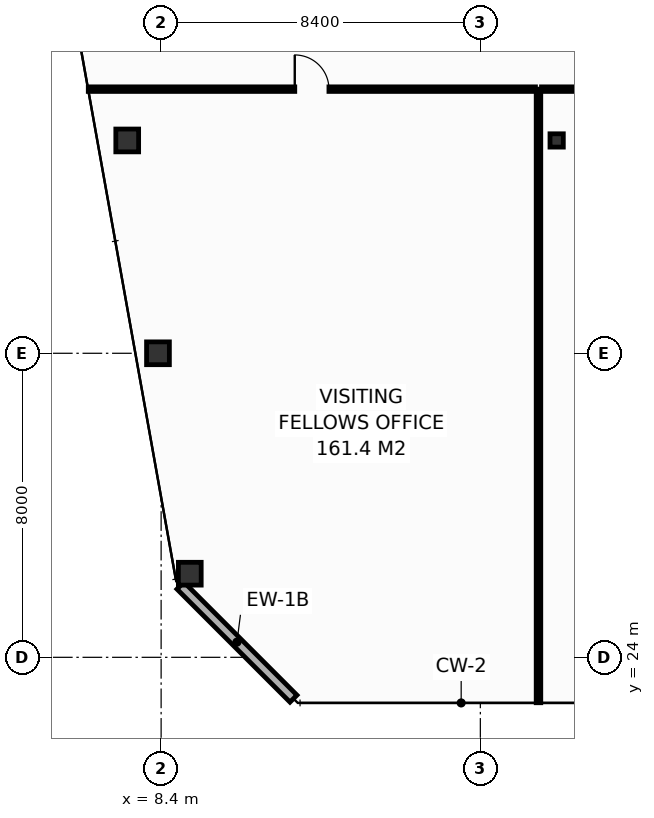
"""IFC4 building model, lengths in metres.
Left out: names, types, materials, properties, quantities, classifications, styles, units other than length and angle.
Written with IfcOpenShell. Run it as: python <this file> out.ifc"""

import sys

from ifc_helpers import new_model, si_unit, direction, frame, frame_2d, origin, origin_2d, place, context, subcontext, project, spatial, rectangle, hollow_rectangle, extrude, element, fill, save


model = new_model("IFC4")
c1 = context("Model", 3, precision=1e-05, world=origin(), true_north=direction((0.0, 1.0)))
c2 = subcontext(c1, "Body", "Model", "MODEL_VIEW")
j1 = project(units=[si_unit("LENGTHUNIT", "METRE"), si_unit("PLANEANGLEUNIT", "RADIAN")], contexts=[c1])
p1 = place(None, origin())
s1 = spatial("IfcSite", under=j1, at=p1, CompositionType="ELEMENT")
p2 = place(p1, origin())
s2 = spatial("IfcBuilding", under=s1, at=p2, CompositionType="ELEMENT")
p3 = place(p2, frame((0.0, 0.0, 264.8)))
s3 = spatial("IfcBuildingStorey", under=s2, at=p3, CompositionType="ELEMENT", Elevation=264.8)
for number, where, z_axis, x_axis in (
    (1, (9.154, 26.2, 0.0), (0.0, 0.0, 1.0), (1.0, 0.0, 0.0)),
    (2, (8.317, 32.0, 0.0), (0.0, 0.0, 1.0), (1.0, 0.0, 0.0)),
    (3, (7.508, 37.6, 0.0), (0.0, 0.0, 1.0), (1.0, 0.0, 0.0)),
):
    element("IfcColumn", number, at=place(p3, frame(where, z_axis=z_axis, x_axis=x_axis)), inside=s3, PredefinedType="COLUMN", context=c2, shape_type="SweptSolid", body=[
        extrude(hollow_rectangle(XDim=0.6, YDim=0.6, WallThickness=0.028, at=origin_2d()), origin(), (0.0, 0.0, 1.0), 3.8),
    ])
p4 = place(p3, frame((18.808, 37.6, 0.0), z_axis=(0.0, 0.0, 1.0), x_axis=(1.0, 0.0, 0.0)))
e4 = element("IfcColumn", 4, at=p4, inside=s3, PredefinedType="COLUMN", context=c2, shape_type="SweptSolid", body=[
    extrude(hollow_rectangle(XDim=0.35, YDim=0.35, WallThickness=0.016, at=origin_2d()), origin(), (0.0, 0.0, 1.0), 3.8),
])
p5 = place(p3, frame((8.909, 25.887, 0.0), z_axis=(0.0, 0.0, 1.0), x_axis=(0.707106781187, -0.707106781187, 0.0)))
e5 = element("IfcWall", 5, at=p5, inside=s3, PredefinedType="STANDARD", context=c2, shape_type="SweptSolid", body=[
    extrude(rectangle(XDim=4.206, YDim=0.26, at=frame_2d((2.103, 0.0))), origin(), (0.0, 0.0, 1.0), 3.55),
])
p6 = place(p3, frame((18.33, 22.805, 0.0), z_axis=(0.0, 0.0, 1.0), x_axis=(0.0, 1.0, 0.0)))
e6 = element("IfcWall", 6, at=p6, inside=s3, PredefinedType="PARTITIONING", context=c2, shape_type="SweptSolid", body=[
    extrude(rectangle(XDim=16.145, YDim=0.12, at=frame_2d((8.073, 0.0))), origin(), (0.0, 0.0, 1.0), 2.947),
])
p7 = place(p3, frame((6.483, 38.95, 0.0), z_axis=(0.0, 0.0, 1.0), x_axis=(1.0, 0.0, 0.0)))
e7 = element("IfcWall", 7, at=p7, inside=s3, PredefinedType="PARTITIONING", context=c2, shape_type="SweptSolid", body=[
    extrude(rectangle(XDim=11.767, YDim=0.12, at=frame_2d((5.883, 0.0))), origin(), (0.0, 0.0, 1.0), 3.085),
])
p8 = place(p7, frame((5.433, 0.0, 0.0)))
e8 = element("IfcOpeningElement", 8, at=p8, cuts=e7, PredefinedType="OPENING", context=c2, shape_type="SweptSolid", body=[
    extrude(rectangle(XDim=0.9, YDim=2.1, at=frame_2d((0.45, 1.05))), frame((0.0, 0.07, 0.0), z_axis=(0.0, -1.0, 0.0), x_axis=(1.0, 0.0, 0.0)), (0.0, 0.0, 1.0), 0.14),
])
p9 = place(p3, frame((18.41, 38.95, 0.0), z_axis=(0.0, 0.0, 1.0), x_axis=(1.0, 0.0, 0.0)))
e9 = element("IfcWall", 9, at=p9, inside=s3, PredefinedType="PARTITIONING", context=c2, shape_type="SweptSolid", body=[
    extrude(rectangle(XDim=9.173, YDim=0.12, at=frame_2d((4.586, 0.0))), origin(), (0.0, 0.0, 1.0), 2.947),
])
p10 = place(p9, frame((4.136, 0.0, 0.0)))
e10 = element("IfcOpeningElement", 10, at=p10, cuts=e9, PredefinedType="OPENING", context=c2, shape_type="SweptSolid", body=[
    extrude(rectangle(XDim=0.9, YDim=2.1, at=frame_2d((0.45, 1.05))), frame((0.0, 0.07, 0.0), z_axis=(0.0, -1.0, 0.0), x_axis=(1.0, 0.0, 0.0)), (0.0, 0.0, 1.0), 0.14),
])
p11 = place(p8, origin())
e11 = element("IfcDoor", 11, at=p11, inside=s3, OperationType="SINGLE_SWING_LEFT", PredefinedType="DOOR", context=c2, shape_type="SweptSolid", body=[
    extrude(rectangle(XDim=0.9, YDim=2.1, at=frame_2d((0.45, 1.05))), frame((0.0, 0.025, 0.0), z_axis=(0.0, -1.0, 0.0), x_axis=(1.0, 0.0, 0.0)), (0.0, 0.0, 1.0), 0.05),
])
fill(e8, e11)
save(model, sys.argv[1])
